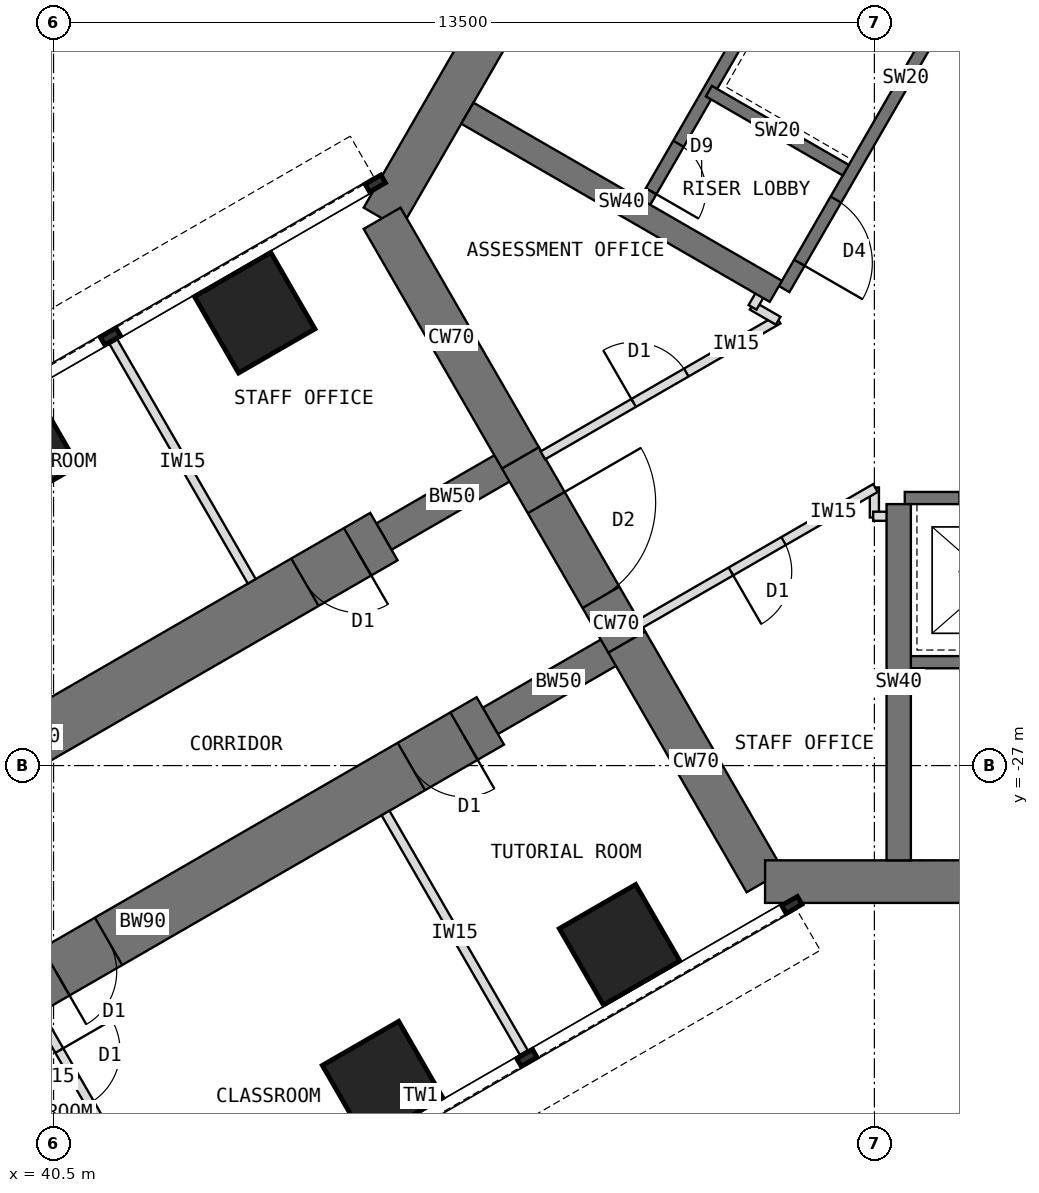
"""IFC4 building model, lengths in metres.
Left out: names, types, materials, properties, quantities, classifications, styles, units other than length and angle.
Written with IfcOpenShell. Run it as: python <this file> out.ifc"""

import sys

from ifc_helpers import new_model, si_unit, direction, frame, frame_2d, origin, origin_2d, place, context, subcontext, project, spatial, rectangle, extrude, element, fill, save


model = new_model("IFC4")
c1 = context("Model", 3, precision=1e-05, world=origin(), true_north=direction((0.0, 1.0)))
c2 = subcontext(c1, "Body", "Model", "MODEL_VIEW")
j1 = project(units=[si_unit("LENGTHUNIT", "METRE"), si_unit("PLANEANGLEUNIT", "RADIAN")], contexts=[c1])
p1 = place(None, origin())
s1 = spatial("IfcSite", under=j1, at=p1, CompositionType="ELEMENT")
p2 = place(p1, origin())
s2 = spatial("IfcBuilding", under=s1, at=p2, CompositionType="ELEMENT")
p3 = place(p2, frame((0.0, 0.0, 56.5)))
s3 = spatial("IfcBuildingStorey", under=s2, at=p3, CompositionType="ELEMENT", Elevation=56.5)
p4 = place(p3, frame((52.202, -7.092, 0.0), z_axis=(0.0, 0.0, 1.0), x_axis=(-0.500005998175, -0.866021940709, 0.0)))
e1 = element("IfcWall", 1, at=p4, inside=s3, PredefinedType="SHEAR", context=c2, shape_type="SweptSolid", body=[
    extrude(rectangle(XDim=12.596, YDim=0.7, at=frame_2d((6.298, 0.0))), origin(), (0.0, 0.0, 1.0), 4.0),
])
p5 = place(p3, frame((45.904, -18.0, 0.0), z_axis=(0.0, 0.0, 1.0), x_axis=(0.500024481964, -0.866011268655, 0.0)))
e2 = element("IfcWall", 2, at=p5, inside=s3, PredefinedType="SHEAR", context=c2, shape_type="SweptSolid", body=[
    extrude(rectangle(XDim=4.548, YDim=0.7, at=frame_2d((2.274, 0.0))), origin(), (0.0, 0.0, 1.0), 4.0),
])
p6 = place(p3, frame((48.178, -21.939, 0.0), z_axis=(0.0, 0.0, 1.0), x_axis=(0.500010275428, -0.866019471182, 0.0)))
e3 = element("IfcWall", 3, at=p6, inside=s3, PredefinedType="SHEAR", context=c2, shape_type="SweptSolid", body=[
    extrude(rectangle(XDim=3.5, YDim=0.7, at=frame_2d((1.75, 0.0))), origin(), (0.0, 0.0, 1.0), 4.0),
])
p7 = place(p6, frame((0.85, 0.0, 0.0)))
e4 = element("IfcOpeningElement", 4, at=p7, cuts=e3, PredefinedType="OPENING", context=c2, shape_type="SweptSolid", body=[
    extrude(rectangle(XDim=1.8, YDim=2.1, at=frame_2d((0.9, 1.05))), frame((0.0, 0.36, 0.0), z_axis=(0.0, -1.0, 0.0), x_axis=(1.0, 0.0, 0.0)), (0.0, 0.0, 1.0), 0.72),
])
p8 = place(p3, frame((49.928, -24.97, 0.0), z_axis=(0.0, 0.0, 1.0), x_axis=(0.499984222037, -0.866034513004, 0.0)))
e5 = element("IfcWall", 5, at=p8, inside=s3, PredefinedType="SHEAR", context=c2, shape_type="SweptSolid", body=[
    extrude(rectangle(XDim=4.548, YDim=0.7, at=frame_2d((2.274, 0.0))), origin(), (0.0, 0.0, 1.0), 4.0),
])
p9 = place(p3, frame((52.202, -28.908, 0.0), z_axis=(0.0, 0.0, 1.0), x_axis=(1.0, 0.0, 0.0)))
e6 = element("IfcWall", 6, at=p9, inside=s3, PredefinedType="SHEAR", context=c2, shape_type="SweptSolid", body=[
    extrude(rectangle(XDim=12.596, YDim=0.7, at=frame_2d((6.298, 0.0))), origin(), (0.0, 0.0, 1.0), 4.0),
])
p10 = place(p3, frame((49.928, -24.97, 0.0), z_axis=(0.0, 0.0, 1.0), x_axis=(-0.866031863473, -0.499988811324, 0.0)))
e7 = element("IfcWall", 7, at=p10, inside=s3, PredefinedType="SHEAR", context=c2, shape_type="SweptSolid", body=[
    extrude(rectangle(XDim=2.592, YDim=0.5, at=frame_2d((1.296, 0.0))), origin(), (0.0, 0.0, 1.0), 4.0),
])
p11 = place(p3, frame((47.684, -26.266, 0.0), z_axis=(0.0, 0.0, 1.0), x_axis=(-0.866027579429, -0.499996231654, 0.0)))
e8 = element("IfcWall", 8, at=p11, inside=s3, PredefinedType="SHEAR", context=c2, shape_type="SweptSolid", body=[
    extrude(rectangle(XDim=13.2, YDim=0.9, at=frame_2d((6.6, 0.0))), origin(), (0.0, 0.0, 1.0), 4.0),
])
p12 = place(p11, frame((0.5, 0.0, 0.0)))
e9 = element("IfcOpeningElement", 9, at=p12, cuts=e8, PredefinedType="OPENING", context=c2, shape_type="SweptSolid", body=[
    extrude(rectangle(XDim=1.0, YDim=2.1, at=frame_2d((0.5, 1.05))), frame((0.0, 0.46, 0.0), z_axis=(0.0, -1.0, 0.0), x_axis=(1.0, 0.0, 0.0)), (0.0, 0.0, 1.0), 0.92),
])
p13 = place(p11, frame((7.25, 0.0, 0.0)))
e10 = element("IfcOpeningElement", 10, at=p13, cuts=e8, PredefinedType="OPENING", context=c2, shape_type="SweptSolid", body=[
    extrude(rectangle(XDim=1.0, YDim=2.1, at=frame_2d((0.5, 1.05))), frame((0.0, 0.46, 0.0), z_axis=(0.0, -1.0, 0.0), x_axis=(1.0, 0.0, 0.0)), (0.0, 0.0, 1.0), 0.92),
])
p14 = place(p3, frame((48.178, -21.939, 0.0), z_axis=(0.0, 0.0, 1.0), x_axis=(-0.866072649678, -0.499918158782, 0.0)))
e11 = element("IfcWall", 11, at=p14, inside=s3, PredefinedType="SHEAR", context=c2, shape_type="SweptSolid", body=[
    extrude(rectangle(XDim=2.592, YDim=0.5, at=frame_2d((1.296, 0.0))), origin(), (0.0, 0.0, 1.0), 4.0),
])
p15 = place(p3, frame((45.934, -23.234, 0.0), z_axis=(0.0, 0.0, 1.0), x_axis=(-0.866019570528, -0.500010103361, 0.0)))
e12 = element("IfcWall", 12, at=p15, inside=s3, PredefinedType="SHEAR", context=c2, shape_type="SweptSolid", body=[
    extrude(rectangle(XDim=13.2, YDim=0.9, at=frame_2d((6.6, 0.0))), origin(), (0.0, 0.0, 1.0), 4.0),
])
p16 = place(p15, frame((0.5, 0.0, 0.0)))
e13 = element("IfcOpeningElement", 13, at=p16, cuts=e12, PredefinedType="OPENING", context=c2, shape_type="SweptSolid", body=[
    extrude(rectangle(XDim=1.0, YDim=2.1, at=frame_2d((0.5, 1.05))), frame((0.0, 0.46, 0.0), z_axis=(0.0, -1.0, 0.0), x_axis=(1.0, 0.0, 0.0)), (0.0, 0.0, 1.0), 0.92),
])
p17 = place(p15, frame((7.25, 0.0, 0.0)))
e14 = element("IfcOpeningElement", 14, at=p17, cuts=e12, PredefinedType="OPENING", context=c2, shape_type="SweptSolid", body=[
    extrude(rectangle(XDim=1.0, YDim=2.1, at=frame_2d((0.5, 1.05))), frame((0.0, 0.46, 0.0), z_axis=(0.0, -1.0, 0.0), x_axis=(1.0, 0.0, 0.0)), (0.0, 0.0, 1.0), 0.92),
])
for number, where, z_axis, x_axis in (
    (15, (49.809, -29.946, 0.0), (0.0, 0.0, 1.0), (0.866, 0.5, 0.0)),
    (16, (43.809, -19.554, 0.0), (0.0, 0.0, 1.0), (0.866, 0.5, 0.0)),
    (17, (45.912, -32.196, 0.0), (0.0, 0.0, 1.0), (0.866, 0.5, 0.0)),
    (18, (39.912, -21.804, 0.0), (0.0, 0.0, 1.0), (0.866, 0.5, 0.0)),
):
    element("IfcColumn", number, at=place(p3, frame(where, z_axis=z_axis, x_axis=x_axis)), inside=s3, PredefinedType="COLUMN", context=c2, shape_type="SweptSolid", body=[
        extrude(rectangle(XDim=1.45, YDim=1.45, at=origin_2d()), origin(), (0.0, 0.0, 1.0), 4.0),
    ])
p18 = place(p3, frame((56.516, -12.236, 0.0), z_axis=(0.0, 0.0, 1.0), x_axis=(-0.49999894854, -0.866026010844, 0.0)))
e19 = element("IfcWall", 19, at=p18, inside=s3, PredefinedType="SHEAR", context=c2, shape_type="SweptSolid", body=[
    extrude(rectangle(XDim=8.0, YDim=0.2, at=frame_2d((4.0, 0.0))), origin(), (0.0, 0.0, 1.0), 4.0),
])
p19 = place(p18, frame((6.3, 0.0, 0.0)))
e20 = element("IfcOpeningElement", 20, at=p19, cuts=e19, PredefinedType="OPENING", context=c2, shape_type="SweptSolid", body=[
    extrude(rectangle(XDim=1.2, YDim=2.1, at=frame_2d((0.6, 1.05))), frame((0.0, 0.11, 0.0), z_axis=(0.0, -1.0, 0.0), x_axis=(1.0, 0.0, 0.0)), (0.0, 0.0, 1.0), 0.22),
])
p20 = place(p3, frame((53.53, -17.209, 0.0), z_axis=(0.0, 0.0, 1.0), x_axis=(-0.866062058628, 0.499936506574, 0.0)))
e21 = element("IfcWall", 21, at=p20, inside=s3, PredefinedType="SHEAR", context=c2, shape_type="SweptSolid", body=[
    extrude(rectangle(XDim=2.6, YDim=0.2, at=frame_2d((1.3, 0.0))), origin(), (0.0, 0.0, 1.0), 4.0),
])
p21 = place(p3, frame((54.178, -10.886, 0.0), z_axis=(0.0, 0.0, 1.0), x_axis=(-0.49999894854, -0.866026010844, 0.0)))
e22 = element("IfcWall", 22, at=p21, inside=s3, PredefinedType="SHEAR", context=c2, shape_type="SweptSolid", body=[
    extrude(rectangle(XDim=8.0, YDim=0.2, at=frame_2d((4.0, 0.0))), origin(), (0.0, 0.0, 1.0), 4.0),
])
p22 = place(p21, frame((6.8, 0.0, 0.0)))
e23 = element("IfcOpeningElement", 23, at=p22, cuts=e22, PredefinedType="OPENING", context=c2, shape_type="SweptSolid", body=[
    extrude(rectangle(XDim=0.9, YDim=2.1, at=frame_2d((0.45, 1.05))), frame((0.0, 0.11, 0.0), z_axis=(0.0, -1.0, 0.0), x_axis=(1.0, 0.0, 0.0)), (0.0, 0.0, 1.0), 0.22),
])
p23 = place(p3, frame((52.38, -19.201, 0.0), z_axis=(0.0, 0.0, 1.0), x_axis=(-0.866023886965, 0.500002627198, 0.0)))
e24 = element("IfcWall", 24, at=p23, inside=s3, PredefinedType="SHEAR", context=c2, shape_type="SweptSolid", body=[
    extrude(rectangle(XDim=5.858, YDim=0.4, at=frame_2d((2.929, 0.0))), origin(), (0.0, 0.0, 1.0), 4.0),
])
p24 = place(p3, frame((54.5, -22.6, 0.0), z_axis=(0.0, 0.0, 1.0), x_axis=(1.0, 0.0, 0.0)))
e25 = element("IfcWall", 25, at=p24, inside=s3, PredefinedType="SHEAR", context=c2, shape_type="SweptSolid", body=[
    extrude(rectangle(XDim=8.0, YDim=0.2, at=frame_2d((4.0, 0.0))), origin(), (0.0, 0.0, 1.0), 4.0),
])
p25 = place(p24, frame((6.3, 0.0, 0.0)))
e26 = element("IfcOpeningElement", 26, at=p25, cuts=e25, PredefinedType="OPENING", context=c2, shape_type="SweptSolid", body=[
    extrude(rectangle(XDim=1.2, YDim=2.1, at=frame_2d((0.6, 1.05))), frame((0.0, 0.11, 0.0), z_axis=(0.0, -1.0, 0.0), x_axis=(1.0, 0.0, 0.0)), (0.0, 0.0, 1.0), 0.22),
])
p26 = place(p24, frame((0.9, 0.0, 0.0)))
e27 = element("IfcOpeningElement", 27, at=p26, cuts=e25, PredefinedType="OPENING", context=c2, shape_type="SweptSolid", body=[
    extrude(rectangle(XDim=1.1, YDim=2.2, at=frame_2d((0.55, 1.1))), frame((0.0, 0.11, 0.0), z_axis=(0.0, -1.0, 0.0), x_axis=(1.0, 0.0, 0.0)), (0.0, 0.0, 1.0), 0.22),
])
p27 = place(p3, frame((54.5, -25.3, 0.0), z_axis=(0.0, 0.0, 1.0), x_axis=(1.0, 0.0, 0.0)))
e28 = element("IfcWall", 28, at=p27, inside=s3, PredefinedType="SHEAR", context=c2, shape_type="SweptSolid", body=[
    extrude(rectangle(XDim=8.0, YDim=0.2, at=frame_2d((4.0, 0.0))), origin(), (0.0, 0.0, 1.0), 4.0),
])
p28 = place(p27, frame((6.7, 0.0, 0.0)))
e29 = element("IfcOpeningElement", 29, at=p28, cuts=e28, PredefinedType="OPENING", context=c2, shape_type="SweptSolid", body=[
    extrude(rectangle(XDim=1.1, YDim=2.1, at=frame_2d((0.55, 1.05))), frame((0.0, 0.11, 0.0), z_axis=(0.0, -1.0, 0.0), x_axis=(1.0, 0.0, 0.0)), (0.0, 0.0, 1.0), 0.22),
])
p29 = place(p3, frame((54.4, -22.7, 0.0), z_axis=(0.0, 0.0, 1.0), x_axis=(0.0, -1.0, 0.0)))
e30 = element("IfcWall", 30, at=p29, inside=s3, PredefinedType="SHEAR", context=c2, shape_type="SweptSolid", body=[
    extrude(rectangle(XDim=5.858, YDim=0.4, at=frame_2d((2.929, 0.0))), origin(), (0.0, 0.0, 1.0), 4.0),
])
p30 = place(p3, frame((45.96, -27.78, 0.0), z_axis=(0.0, 0.0, 1.0), x_axis=(0.499982560684, -0.866035472144, 0.0)))
e31 = element("IfcWall", 31, at=p30, inside=s3, PredefinedType="PARTITIONING", context=c2, shape_type="SweptSolid", body=[
    extrude(rectangle(XDim=4.55, YDim=0.15, at=frame_2d((2.275, 0.0))), origin(), (0.0, 0.0, 1.0), 3.8),
])
p31 = place(p3, frame((40.244, -31.08, 0.0), z_axis=(0.0, 0.0, 1.0), x_axis=(0.500001309137, -0.866024647952, 0.0)))
e32 = element("IfcWall", 32, at=p31, inside=s3, PredefinedType="PARTITIONING", context=c2, shape_type="SweptSolid", body=[
    extrude(rectangle(XDim=2.4, YDim=0.15, at=frame_2d((1.2, 0.0))), origin(), (0.0, 0.0, 1.0), 3.8),
])
p32 = place(p31, frame((0.7, 0.0, 0.0)))
e33 = element("IfcOpeningElement", 33, at=p32, cuts=e32, PredefinedType="OPENING", context=c2, shape_type="SweptSolid", body=[
    extrude(rectangle(XDim=1.0, YDim=2.1, at=frame_2d((0.5, 1.05))), frame((0.0, 0.085, 0.0), z_axis=(0.0, -1.0, 0.0), x_axis=(1.0, 0.0, 0.0)), (0.0, 0.0, 1.0), 0.17),
])
p33 = place(p3, frame((43.76, -23.97, 0.0), z_axis=(0.0, 0.0, 1.0), x_axis=(-0.499982560684, 0.866035472144, 0.0)))
e34 = element("IfcWall", 34, at=p33, inside=s3, PredefinedType="PARTITIONING", context=c2, shape_type="SweptSolid", body=[
    extrude(rectangle(XDim=4.55, YDim=0.15, at=frame_2d((2.275, 0.0))), origin(), (0.0, 0.0, 1.0), 3.8),
])
p34 = place(p3, frame((54.0, -22.92, 0.0), z_axis=(0.0, 0.0, 1.0), x_axis=(0.0, 1.0, 0.0)))
e35 = element("IfcWall", 35, at=p34, inside=s3, PredefinedType="PARTITIONING", context=c2, shape_type="SweptSolid", body=[
    extrude(rectangle(XDim=0.494, YDim=0.15, at=frame_2d((0.247, 0.0))), origin(), (0.0, 0.0, 1.0), 3.8),
])
p35 = place(p3, frame((54.017, -22.436, 0.0), z_axis=(0.0, 0.0, 1.0), x_axis=(-0.866015446554, -0.500017246033, 0.0)))
e36 = element("IfcWall", 36, at=p35, inside=s3, PredefinedType="PARTITIONING", context=c2, shape_type="SweptSolid", body=[
    extrude(rectangle(XDim=4.469, YDim=0.15, at=frame_2d((2.234, 0.0))), origin(), (0.0, 0.0, 1.0), 3.8),
])
p36 = place(p35, frame((1.744, 0.0, 0.0)))
e37 = element("IfcOpeningElement", 37, at=p36, cuts=e36, PredefinedType="OPENING", context=c2, shape_type="SweptSolid", body=[
    extrude(rectangle(XDim=1.0, YDim=2.1, at=frame_2d((0.5, 1.05))), frame((0.0, 0.085, 0.0), z_axis=(0.0, -1.0, 0.0), x_axis=(1.0, 0.0, 0.0)), (0.0, 0.0, 1.0), 0.17),
])
p37 = place(p3, frame((48.548, -21.898, 0.0), z_axis=(0.0, 0.0, 1.0), x_axis=(0.866025445582, 0.499999927604, 0.0)))
e38 = element("IfcWall", 38, at=p37, inside=s3, PredefinedType="PARTITIONING", context=c2, shape_type="SweptSolid", body=[
    extrude(rectangle(XDim=4.468, YDim=0.15, at=frame_2d((2.234, 0.0))), origin(), (0.0, 0.0, 1.0), 3.8),
])
p38 = place(p37, frame((1.724, 0.0, 0.0)))
e39 = element("IfcOpeningElement", 39, at=p38, cuts=e38, PredefinedType="OPENING", context=c2, shape_type="SweptSolid", body=[
    extrude(rectangle(XDim=1.0, YDim=2.1, at=frame_2d((0.5, 1.05))), frame((0.0, 0.085, 0.0), z_axis=(0.0, -1.0, 0.0), x_axis=(1.0, 0.0, 0.0)), (0.0, 0.0, 1.0), 0.17),
])
p39 = place(p3, frame((52.417, -19.684, 0.0), z_axis=(0.0, 0.0, 1.0), x_axis=(-0.865831790172, 0.50033519877, 0.0)))
e40 = element("IfcWall", 40, at=p39, inside=s3, PredefinedType="PARTITIONING", context=c2, shape_type="SweptSolid", body=[
    extrude(rectangle(XDim=0.494, YDim=0.15, at=frame_2d((0.247, 0.0))), origin(), (0.0, 0.0, 1.0), 3.8),
])
for number, where, z_axis, x_axis in (
    (41, (51.997, -19.464, 0.0), (0.0, 0.0, 1.0), (0.5, 0.866, 0.0)),
    (42, (54.41, -22.9, 0.0), (0.0, 0.0, 1.0), (-1.0, 0.0, 0.0)),
):
    element("IfcWall", number, at=place(p3, frame(where, z_axis=z_axis, x_axis=x_axis)), inside=s3, PredefinedType="PARTITIONING", context=c2, shape_type="SweptSolid", body=[
        extrude(rectangle(XDim=0.43, YDim=0.15, at=frame_2d((0.215, 0.0))), origin(), (0.0, 0.0, 1.0), 3.8),
    ])
p40 = place(p19, origin())
e43 = element("IfcDoor", 43, at=p40, inside=s3, OperationType="SINGLE_SWING_RIGHT", PredefinedType="DOOR", context=c2, shape_type="SweptSolid", body=[
    extrude(rectangle(XDim=1.2, YDim=2.1, at=frame_2d((0.6, 1.05))), frame((0.0, 0.025, 0.0), z_axis=(0.0, -1.0, 0.0), x_axis=(1.0, 0.0, 0.0)), (0.0, 0.0, 1.0), 0.05),
])
fill(e20, e43)
p41 = place(p22, origin())
e44 = element("IfcDoor", 44, at=p41, inside=s3, OperationType="SINGLE_SWING_RIGHT", PredefinedType="DOOR", context=c2, shape_type="SweptSolid", body=[
    extrude(rectangle(XDim=0.9, YDim=2.1, at=frame_2d((0.45, 1.05))), frame((0.0, 0.025, 0.0), z_axis=(0.0, -1.0, 0.0), x_axis=(1.0, 0.0, 0.0)), (0.0, 0.0, 1.0), 0.05),
])
fill(e23, e44)
p42 = place(p7, origin())
e45 = element("IfcDoor", 45, at=p42, inside=s3, OperationType="DOUBLE_DOOR_DOUBLE_SWING", PredefinedType="DOOR", context=c2, shape_type="SweptSolid", body=[
    extrude(rectangle(XDim=1.72, YDim=2.06, at=frame_2d((0.9, 1.03))), frame((0.0, 0.025, 0.0), z_axis=(0.0, -1.0, 0.0), x_axis=(1.0, 0.0, 0.0)), (0.0, 0.0, 1.0), 0.05),
    extrude(rectangle(XDim=0.04, YDim=2.1, at=frame_2d((0.02, 1.05))), frame((0.0, 0.35, 0.0), z_axis=(0.0, -1.0, 0.0), x_axis=(1.0, 0.0, 0.0)), (0.0, 0.0, 1.0), 0.699),
    extrude(rectangle(XDim=0.04, YDim=2.1, at=frame_2d((1.78, 1.05))), frame((0.0, 0.35, 0.0), z_axis=(0.0, -1.0, 0.0), x_axis=(1.0, 0.0, 0.0)), (0.0, 0.0, 1.0), 0.699),
    extrude(rectangle(XDim=1.72, YDim=0.04, at=frame_2d((0.9, 2.08))), frame((0.0, 0.35, 0.0), z_axis=(0.0, -1.0, 0.0), x_axis=(1.0, 0.0, 0.0)), (0.0, 0.0, 1.0), 0.699),
])
fill(e4, e45)
p43 = place(p32, origin())
e46 = element("IfcDoor", 46, at=p43, inside=s3, OperationType="SINGLE_SWING_LEFT", PredefinedType="DOOR", context=c2, shape_type="SweptSolid", body=[
    extrude(rectangle(XDim=1.0, YDim=2.1, at=frame_2d((0.5, 1.05))), frame((0.0, 0.025, 0.0), z_axis=(0.0, -1.0, 0.0), x_axis=(1.0, 0.0, 0.0)), (0.0, 0.0, 1.0), 0.05),
])
fill(e33, e46)
p44 = place(p38, origin())
e47 = element("IfcDoor", 47, at=p44, inside=s3, OperationType="SINGLE_SWING_LEFT", PredefinedType="DOOR", context=c2, shape_type="SweptSolid", body=[
    extrude(rectangle(XDim=1.0, YDim=2.1, at=frame_2d((0.5, 1.05))), frame((0.0, 0.025, 0.0), z_axis=(0.0, -1.0, 0.0), x_axis=(1.0, 0.0, 0.0)), (0.0, 0.0, 1.0), 0.05),
])
fill(e39, e47)
p45 = place(p36, origin())
e48 = element("IfcDoor", 48, at=p45, inside=s3, OperationType="SINGLE_SWING_RIGHT", PredefinedType="DOOR", context=c2, shape_type="SweptSolid", body=[
    extrude(rectangle(XDim=1.0, YDim=2.1, at=frame_2d((0.5, 1.05))), frame((0.0, 0.025, 0.0), z_axis=(0.0, -1.0, 0.0), x_axis=(1.0, 0.0, 0.0)), (0.0, 0.0, 1.0), 0.05),
])
fill(e37, e48)
p46 = place(p12, origin())
e49 = element("IfcDoor", 49, at=p46, inside=s3, OperationType="SINGLE_SWING_LEFT", PredefinedType="DOOR", context=c2, shape_type="SweptSolid", body=[
    extrude(rectangle(XDim=0.92, YDim=2.06, at=frame_2d((0.5, 1.03))), frame((0.0, 0.025, 0.0), z_axis=(0.0, -1.0, 0.0), x_axis=(1.0, 0.0, 0.0)), (0.0, 0.0, 1.0), 0.05),
    extrude(rectangle(XDim=0.04, YDim=2.1, at=frame_2d((0.02, 1.05))), frame((0.0, 0.45, 0.0), z_axis=(0.0, -1.0, 0.0), x_axis=(1.0, 0.0, 0.0)), (0.0, 0.0, 1.0), 0.899),
    extrude(rectangle(XDim=0.04, YDim=2.1, at=frame_2d((0.98, 1.05))), frame((0.0, 0.45, 0.0), z_axis=(0.0, -1.0, 0.0), x_axis=(1.0, 0.0, 0.0)), (0.0, 0.0, 1.0), 0.899),
    extrude(rectangle(XDim=0.92, YDim=0.04, at=frame_2d((0.5, 2.08))), frame((0.0, 0.45, 0.0), z_axis=(0.0, -1.0, 0.0), x_axis=(1.0, 0.0, 0.0)), (0.0, 0.0, 1.0), 0.899),
])
fill(e9, e49)
p47 = place(p13, origin())
e50 = element("IfcDoor", 50, at=p47, inside=s3, OperationType="SINGLE_SWING_RIGHT", PredefinedType="DOOR", context=c2, shape_type="SweptSolid", body=[
    extrude(rectangle(XDim=0.92, YDim=2.06, at=frame_2d((0.5, 1.03))), frame((0.0, 0.025, 0.0), z_axis=(0.0, -1.0, 0.0), x_axis=(1.0, 0.0, 0.0)), (0.0, 0.0, 1.0), 0.05),
    extrude(rectangle(XDim=0.04, YDim=2.1, at=frame_2d((0.02, 1.05))), frame((0.0, 0.45, 0.0), z_axis=(0.0, -1.0, 0.0), x_axis=(1.0, 0.0, 0.0)), (0.0, 0.0, 1.0), 0.899),
    extrude(rectangle(XDim=0.04, YDim=2.1, at=frame_2d((0.98, 1.05))), frame((0.0, 0.45, 0.0), z_axis=(0.0, -1.0, 0.0), x_axis=(1.0, 0.0, 0.0)), (0.0, 0.0, 1.0), 0.899),
    extrude(rectangle(XDim=0.92, YDim=0.04, at=frame_2d((0.5, 2.08))), frame((0.0, 0.45, 0.0), z_axis=(0.0, -1.0, 0.0), x_axis=(1.0, 0.0, 0.0)), (0.0, 0.0, 1.0), 0.899),
])
fill(e10, e50)
p48 = place(p16, origin())
e51 = element("IfcDoor", 51, at=p48, inside=s3, OperationType="SINGLE_SWING_LEFT", PredefinedType="DOOR", context=c2, shape_type="SweptSolid", body=[
    extrude(rectangle(XDim=0.92, YDim=2.06, at=frame_2d((0.5, 1.03))), frame((0.0, 0.025, 0.0), z_axis=(0.0, -1.0, 0.0), x_axis=(1.0, 0.0, 0.0)), (0.0, 0.0, 1.0), 0.05),
    extrude(rectangle(XDim=0.04, YDim=2.1, at=frame_2d((0.02, 1.05))), frame((0.0, 0.45, 0.0), z_axis=(0.0, -1.0, 0.0), x_axis=(1.0, 0.0, 0.0)), (0.0, 0.0, 1.0), 0.899),
    extrude(rectangle(XDim=0.04, YDim=2.1, at=frame_2d((0.98, 1.05))), frame((0.0, 0.45, 0.0), z_axis=(0.0, -1.0, 0.0), x_axis=(1.0, 0.0, 0.0)), (0.0, 0.0, 1.0), 0.899),
    extrude(rectangle(XDim=0.92, YDim=0.04, at=frame_2d((0.5, 2.08))), frame((0.0, 0.45, 0.0), z_axis=(0.0, -1.0, 0.0), x_axis=(1.0, 0.0, 0.0)), (0.0, 0.0, 1.0), 0.899),
])
fill(e13, e51)
save(model, sys.argv[1])
